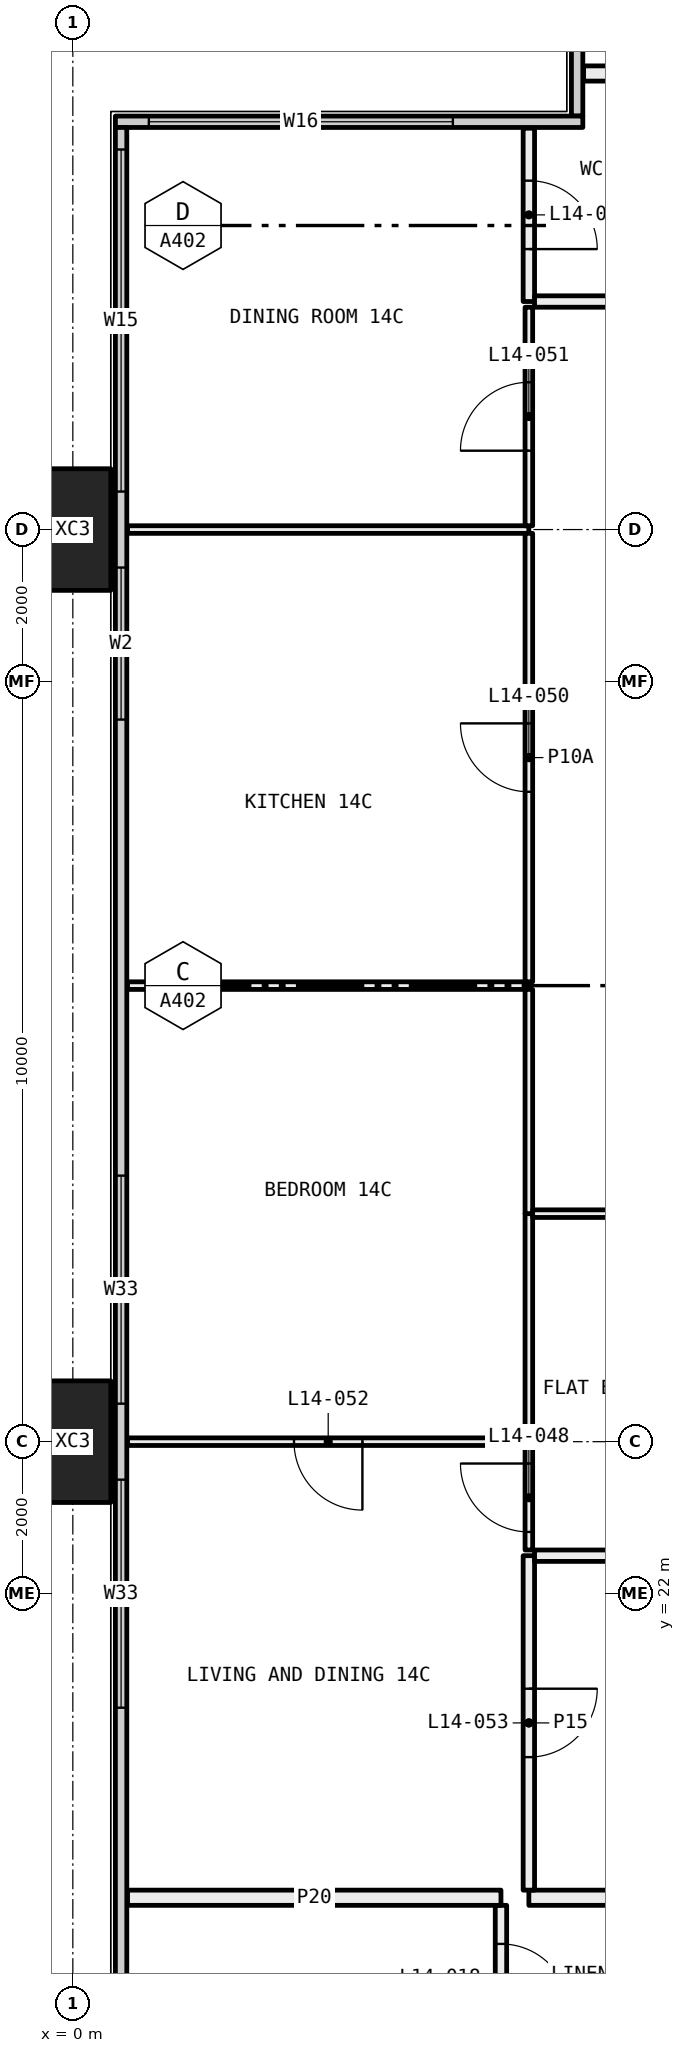
"""IFC4 building model, lengths in metres.
Left out: names, types, materials, properties, quantities, classifications, styles, units other than length and angle.
Written with IfcOpenShell. Run it as: python <this file> out.ifc"""

import sys

from ifc_helpers import new_model, si_unit, direction, frame, frame_2d, origin, origin_2d, place, context, subcontext, project, spatial, rectangle, hollow_rectangle, extrude, element, fill, save


model = new_model("IFC4")
c1 = context("Model", 3, precision=1e-05, world=origin(), true_north=direction((0.0, 1.0)))
c2 = subcontext(c1, "Body", "Model", "MODEL_VIEW")
j1 = project(units=[si_unit("LENGTHUNIT", "METRE"), si_unit("PLANEANGLEUNIT", "RADIAN")], contexts=[c1])
p1 = place(None, origin())
s1 = spatial("IfcSite", under=j1, at=p1, CompositionType="ELEMENT")
p2 = place(p1, origin())
s2 = spatial("IfcBuilding", under=s1, at=p2, CompositionType="ELEMENT")
p3 = place(p2, frame((0.0, 0.0, 61.05)))
s3 = spatial("IfcBuildingStorey", under=s2, at=p3, CompositionType="ELEMENT", Elevation=61.05)
for number, where, z_axis, x_axis in (
    (1, (0.0, 24.0, -0.4), (0.0, 0.0, 1.0), (0.0, 1.0, 0.0)),
    (2, (0.0, 36.0, -0.4), (0.0, 0.0, 1.0), (0.0, 1.0, 0.0)),
):
    element("IfcColumn", number, at=place(p3, frame(where, z_axis=z_axis, x_axis=x_axis)), inside=s3, PredefinedType="COLUMN", context=c2, shape_type="SweptSolid", body=[
        extrude(hollow_rectangle(XDim=1.6, YDim=1.0, WallThickness=0.065, at=origin_2d()), origin(), (0.0, 0.0, 1.0), 3.45),
    ])
p4 = place(p3, frame((6.635, 41.44, 0.0), z_axis=(0.0, 0.0, 1.0), x_axis=(0.0, 1.0, 0.0)))
e3 = element("IfcWall", 3, at=p4, inside=s3, PredefinedType="ELEMENTEDWALL", context=c2, shape_type="SweptSolid", body=[
    extrude(rectangle(XDim=5.85, YDim=0.15, at=frame_2d((2.925, 0.0))), origin(), (0.0, 0.0, 1.0), 3.05),
])
p5 = place(p4, frame((1.56, 0.0, 0.45)))
e4 = element("IfcOpeningElement", 4, at=p5, cuts=e3, PredefinedType="OPENING", context=c2, shape_type="SweptSolid", body=[
    extrude(rectangle(XDim=4.0, YDim=2.55, at=frame_2d((2.0, 1.275))), frame((0.0, 0.085, 0.0), z_axis=(0.0, -1.0, 0.0), x_axis=(1.0, 0.0, 0.0)), (0.0, 0.0, 1.0), 0.17),
])
p6 = place(p3, frame((0.56, 41.365, 0.0), z_axis=(0.0, 0.0, 1.0), x_axis=(1.0, 0.0, 0.0)))
e5 = element("IfcWall", 5, at=p6, inside=s3, PredefinedType="ELEMENTEDWALL", context=c2, shape_type="SweptSolid", body=[
    extrude(rectangle(XDim=6.15, YDim=0.15, at=frame_2d((3.075, 0.0))), origin(), (0.0, 0.0, 1.0), 3.05),
])
p7 = place(p6, frame((0.44, 0.0, 0.45)))
e6 = element("IfcOpeningElement", 6, at=p7, cuts=e5, PredefinedType="OPENING", context=c2, shape_type="SweptSolid", body=[
    extrude(rectangle(XDim=4.0, YDim=2.55, at=frame_2d((2.0, 1.275))), frame((0.0, 0.085, 0.0), z_axis=(0.0, -1.0, 0.0), x_axis=(1.0, 0.0, 0.0)), (0.0, 0.0, 1.0), 0.17),
])
p8 = place(p3, frame((0.635, 6.71, 0.0), z_axis=(0.0, 0.0, 1.0), x_axis=(0.0, 1.0, 0.0)))
e7 = element("IfcWall", 7, at=p8, inside=s3, PredefinedType="ELEMENTEDWALL", context=c2, shape_type="SweptSolid", body=[
    extrude(rectangle(XDim=34.58, YDim=0.15, at=frame_2d((17.29, 0.0))), origin(), (0.0, 0.0, 1.0), 3.05),
])
p9 = place(p8, frame((0.29, 0.0, 0.45)))
e8 = element("IfcOpeningElement", 8, at=p9, cuts=e7, PredefinedType="OPENING", context=c2, shape_type="SweptSolid", body=[
    extrude(rectangle(XDim=4.5, YDim=2.55, at=frame_2d((2.25, 1.275))), frame((0.0, 0.085, 0.0), z_axis=(0.0, -1.0, 0.0), x_axis=(1.0, 0.0, 0.0)), (0.0, 0.0, 1.0), 0.17),
])
p10 = place(p8, frame((5.79, 0.0, 0.45)))
e9 = element("IfcOpeningElement", 9, at=p10, cuts=e7, PredefinedType="OPENING", context=c2, shape_type="SweptSolid", body=[
    extrude(rectangle(XDim=3.0, YDim=2.55, at=frame_2d((1.5, 1.275))), frame((0.0, 0.085, 0.0), z_axis=(0.0, -1.0, 0.0), x_axis=(1.0, 0.0, 0.0)), (0.0, 0.0, 1.0), 0.17),
])
p11 = place(p8, frame((13.79, 0.0, 0.45)))
e10 = element("IfcOpeningElement", 10, at=p11, cuts=e7, PredefinedType="OPENING", context=c2, shape_type="SweptSolid", body=[
    extrude(rectangle(XDim=3.0, YDim=2.55, at=frame_2d((1.5, 1.275))), frame((0.0, 0.085, 0.0), z_axis=(0.0, -1.0, 0.0), x_axis=(1.0, 0.0, 0.0)), (0.0, 0.0, 1.0), 0.17),
])
p12 = place(p8, frame((17.79, 0.0, 0.45)))
e11 = element("IfcOpeningElement", 11, at=p12, cuts=e7, PredefinedType="OPENING", context=c2, shape_type="SweptSolid", body=[
    extrude(rectangle(XDim=3.0, YDim=2.55, at=frame_2d((1.5, 1.275))), frame((0.0, 0.085, 0.0), z_axis=(0.0, -1.0, 0.0), x_axis=(1.0, 0.0, 0.0)), (0.0, 0.0, 1.0), 0.17),
])
p13 = place(p8, frame((26.79, 0.0, 0.45)))
e12 = element("IfcOpeningElement", 12, at=p13, cuts=e7, PredefinedType="OPENING", context=c2, shape_type="SweptSolid", body=[
    extrude(rectangle(XDim=2.0, YDim=2.55, at=frame_2d((1.0, 1.275))), frame((0.0, 0.085, 0.0), z_axis=(0.0, -1.0, 0.0), x_axis=(1.0, 0.0, 0.0)), (0.0, 0.0, 1.0), 0.17),
])
p14 = place(p8, frame((29.79, 0.0, 0.45)))
e13 = element("IfcOpeningElement", 13, at=p14, cuts=e7, PredefinedType="OPENING", context=c2, shape_type="SweptSolid", body=[
    extrude(rectangle(XDim=4.5, YDim=2.55, at=frame_2d((2.25, 1.275))), frame((0.0, 0.085, 0.0), z_axis=(0.0, -1.0, 0.0), x_axis=(1.0, 0.0, 0.0)), (0.0, 0.0, 1.0), 0.17),
])
p15 = place(p3, frame((5.633, 15.985, 0.0), z_axis=(0.0, 0.0, 1.0), x_axis=(0.0, 1.0, 0.0)))
e14 = element("IfcWall", 14, at=p15, inside=s3, PredefinedType="PARTITIONING", context=c2, shape_type="SweptSolid", body=[
    extrude(rectangle(XDim=1.915, YDim=0.15, at=frame_2d((0.958, 0.0))), origin(), (0.0, 0.0, 1.0), 3.05),
])
p16 = place(p15, frame((0.508, 0.0, 0.0)))
e15 = element("IfcOpeningElement", 15, at=p16, cuts=e14, PredefinedType="OPENING", context=c2, shape_type="SweptSolid", body=[
    extrude(rectangle(XDim=0.9, YDim=2.1, at=frame_2d((0.45, 1.05))), frame((0.0, 0.085, 0.0), z_axis=(0.0, -1.0, 0.0), x_axis=(1.0, 0.0, 0.0)), (0.0, 0.0, 1.0), 0.17),
])
p17 = place(p3, frame((5.633, 18.0, 0.0), z_axis=(0.0, 0.0, 1.0), x_axis=(-1.0, 0.0, 0.0)))
e16 = element("IfcWall", 16, at=p17, inside=s3, PredefinedType="PARTITIONING", context=c2, shape_type="SweptSolid", body=[
    extrude(rectangle(XDim=4.913, YDim=0.2, at=frame_2d((2.457, 0.0))), origin(), (0.0, 0.0, 1.0), 3.05),
])
p18 = place(p3, frame((8.644, 18.0, 0.0), z_axis=(0.0, 0.0, 1.0), x_axis=(-1.0, 0.0, 0.0)))
e17 = element("IfcWall", 17, at=p18, inside=s3, PredefinedType="PARTITIONING", context=c2, shape_type="SweptSolid", body=[
    extrude(rectangle(XDim=2.644, YDim=0.2, at=frame_2d((1.322, 0.0))), origin(), (0.0, 0.0, 1.0), 3.05),
])
p19 = place(p3, frame((6.0, 24.0, 0.0), z_axis=(0.0, 0.0, 1.0), x_axis=(-1.0, 0.0, 0.0)))
e18 = element("IfcWall", 18, at=p19, inside=s3, PredefinedType="PARTITIONING", context=c2, shape_type="SweptSolid", body=[
    extrude(rectangle(XDim=5.28, YDim=0.1, at=frame_2d((2.64, 0.0))), origin(), (0.0, 0.0, 1.0), 2.45),
])
p20 = place(p19, frame((2.19, 0.0, 0.0)))
e19 = element("IfcOpeningElement", 19, at=p20, cuts=e18, PredefinedType="OPENING", context=c2, shape_type="SweptSolid", body=[
    extrude(rectangle(XDim=0.9, YDim=2.1, at=frame_2d((0.45, 1.05))), frame((0.0, 0.06, 0.0), z_axis=(0.0, -1.0, 0.0), x_axis=(1.0, 0.0, 0.0)), (0.0, 0.0, 1.0), 0.12),
])
p21 = place(p3, frame((6.0, 18.1, 0.0), z_axis=(0.0, 0.0, 1.0), x_axis=(0.0, 1.0, 0.0)))
e20 = element("IfcWall", 20, at=p21, inside=s3, PredefinedType="PARTITIONING", context=c2, shape_type="SweptSolid", body=[
    extrude(rectangle(XDim=4.4, YDim=0.15, at=frame_2d((2.2, 0.0))), origin(), (0.0, 0.0, 1.0), 3.05),
])
p22 = place(p21, frame((1.75, 0.0, 0.0)))
e21 = element("IfcOpeningElement", 21, at=p22, cuts=e20, PredefinedType="OPENING", context=c2, shape_type="SweptSolid", body=[
    extrude(rectangle(XDim=0.9, YDim=2.1, at=frame_2d((0.45, 1.05))), frame((0.0, 0.085, 0.0), z_axis=(0.0, -1.0, 0.0), x_axis=(1.0, 0.0, 0.0)), (0.0, 0.0, 1.0), 0.17),
])
p23 = place(p3, frame((6.0, 22.575, 0.0), z_axis=(0.0, 0.0, 1.0), x_axis=(0.0, 1.0, 0.0)))
e22 = element("IfcWall", 22, at=p23, inside=s3, PredefinedType="PARTITIONING", context=c2, shape_type="SweptSolid", body=[
    extrude(rectangle(XDim=1.375, YDim=0.1, at=frame_2d((0.688, 0.0))), origin(), (0.0, 0.0, 1.0), 2.45),
])
p24 = place(p23, frame((0.238, 0.0, 0.0)))
e23 = element("IfcOpeningElement", 23, at=p24, cuts=e22, PredefinedType="OPENING", context=c2, shape_type="SweptSolid", body=[
    extrude(rectangle(XDim=0.9, YDim=2.1, at=frame_2d((0.45, 1.05))), frame((0.0, 0.06, 0.0), z_axis=(0.0, -1.0, 0.0), x_axis=(1.0, 0.0, 0.0)), (0.0, 0.0, 1.0), 0.12),
])
p25 = place(p3, frame((6.0, 30.0, 0.0), z_axis=(0.0, 0.0, 1.0), x_axis=(-1.0, 0.0, 0.0)))
e24 = element("IfcWall", 24, at=p25, inside=s3, PredefinedType="PARTITIONING", context=c2, shape_type="SweptSolid", body=[
    extrude(rectangle(XDim=5.28, YDim=0.1, at=frame_2d((2.64, 0.0))), origin(), (0.0, 0.0, 1.0), 3.05),
])
p26 = place(p3, frame((6.0, 24.05, 0.0), z_axis=(0.0, 0.0, 1.0), x_axis=(0.0, 1.0, 0.0)))
e25 = element("IfcWall", 25, at=p26, inside=s3, PredefinedType="PARTITIONING", context=c2, shape_type="SweptSolid", body=[
    extrude(rectangle(XDim=2.95, YDim=0.1, at=frame_2d((1.475, 0.0))), origin(), (0.0, 0.0, 1.0), 2.45),
])
p27 = place(p3, frame((6.0, 27.0, 0.0), z_axis=(0.0, 0.0, 1.0), x_axis=(0.0, 1.0, 0.0)))
e26 = element("IfcWall", 26, at=p27, inside=s3, PredefinedType="PARTITIONING", context=c2, shape_type="SweptSolid", body=[
    extrude(rectangle(XDim=2.95, YDim=0.1, at=frame_2d((1.475, 0.0))), origin(), (0.0, 0.0, 1.0), 3.05),
])
p28 = place(p3, frame((6.0, 36.0, 0.0), z_axis=(0.0, 0.0, 1.0), x_axis=(-1.0, 0.0, 0.0)))
e27 = element("IfcWall", 27, at=p28, inside=s3, PredefinedType="PARTITIONING", context=c2, shape_type="SweptSolid", body=[
    extrude(rectangle(XDim=5.28, YDim=0.1, at=frame_2d((2.64, 0.0))), origin(), (0.0, 0.0, 1.0), 2.45),
])
p29 = place(p3, frame((6.0, 30.05, 0.0), z_axis=(0.0, 0.0, 1.0), x_axis=(0.0, 1.0, 0.0)))
e28 = element("IfcWall", 28, at=p29, inside=s3, PredefinedType="PARTITIONING", context=c2, shape_type="SweptSolid", body=[
    extrude(rectangle(XDim=5.9, YDim=0.1, at=frame_2d((2.95, 0.0))), origin(), (0.0, 0.0, 1.0), 2.45),
])
p30 = place(p29, frame((2.5, 0.0, 0.0)))
e29 = element("IfcOpeningElement", 29, at=p30, cuts=e28, PredefinedType="OPENING", context=c2, shape_type="SweptSolid", body=[
    extrude(rectangle(XDim=0.9, YDim=2.1, at=frame_2d((0.45, 1.05))), frame((0.0, 0.06, 0.0), z_axis=(0.0, -1.0, 0.0), x_axis=(1.0, 0.0, 0.0)), (0.0, 0.0, 1.0), 0.12),
])
p31 = place(p3, frame((6.0, 36.05, 0.0), z_axis=(0.0, 0.0, 1.0), x_axis=(0.0, 1.0, 0.0)))
e30 = element("IfcWall", 30, at=p31, inside=s3, PredefinedType="PARTITIONING", context=c2, shape_type="SweptSolid", body=[
    extrude(rectangle(XDim=2.875, YDim=0.1, at=frame_2d((1.438, 0.0))), origin(), (0.0, 0.0, 1.0), 2.45),
])
p32 = place(p31, frame((0.988, 0.0, 0.0)))
e31 = element("IfcOpeningElement", 31, at=p32, cuts=e30, PredefinedType="OPENING", context=c2, shape_type="SweptSolid", body=[
    extrude(rectangle(XDim=0.9, YDim=2.1, at=frame_2d((0.45, 1.05))), frame((0.0, 0.06, 0.0), z_axis=(0.0, -1.0, 0.0), x_axis=(1.0, 0.0, 0.0)), (0.0, 0.0, 1.0), 0.12),
])
p33 = place(p3, frame((6.0, 39.0, 0.0), z_axis=(0.0, 0.0, 1.0), x_axis=(0.0, 1.0, 0.0)))
e32 = element("IfcWall", 32, at=p33, inside=s3, PredefinedType="PARTITIONING", context=c2, shape_type="SweptSolid", body=[
    extrude(rectangle(XDim=2.28, YDim=0.15, at=frame_2d((1.14, 0.0))), origin(), (0.0, 0.0, 1.0), 3.05),
])
p34 = place(p33, frame((0.69, 0.0, 0.0)))
e33 = element("IfcOpeningElement", 33, at=p34, cuts=e32, PredefinedType="OPENING", context=c2, shape_type="SweptSolid", body=[
    extrude(rectangle(XDim=0.9, YDim=2.1, at=frame_2d((0.45, 1.05))), frame((0.0, 0.085, 0.0), z_axis=(0.0, -1.0, 0.0), x_axis=(1.0, 0.0, 0.0)), (0.0, 0.0, 1.0), 0.17),
])
p35 = place(p3, frame((10.0, 22.5, 0.0), z_axis=(0.0, 0.0, 1.0), x_axis=(-1.0, 0.0, 0.0)))
e34 = element("IfcWall", 34, at=p35, inside=s3, PredefinedType="PARTITIONING", context=c2, shape_type="SweptSolid", body=[
    extrude(rectangle(XDim=3.925, YDim=0.15, at=frame_2d((1.962, 0.0))), origin(), (0.0, 0.0, 1.0), 3.05),
])
p36 = place(p3, frame((10.0, 27.0, 0.0), z_axis=(0.0, 0.0, 1.0), x_axis=(-1.0, 0.0, 0.0)))
e35 = element("IfcWall", 35, at=p36, inside=s3, PredefinedType="PARTITIONING", context=c2, shape_type="SweptSolid", body=[
    extrude(rectangle(XDim=3.95, YDim=0.1, at=frame_2d((1.975, 0.0))), origin(), (0.0, 0.0, 1.0), 3.05),
])
p37 = place(p36, frame((1.525, 0.0, 0.0)))
e36 = element("IfcOpeningElement", 36, at=p37, cuts=e35, PredefinedType="OPENING", context=c2, shape_type="SweptSolid", body=[
    extrude(rectangle(XDim=0.9, YDim=2.1, at=frame_2d((0.45, 1.05))), frame((0.0, 0.06, 0.0), z_axis=(0.0, -1.0, 0.0), x_axis=(1.0, 0.0, 0.0)), (0.0, 0.0, 1.0), 0.12),
])
p38 = place(p3, frame((7.8, 39.0, 0.0), z_axis=(0.0, 0.0, 1.0), x_axis=(-1.0, 0.0, 0.0)))
e37 = element("IfcWall", 37, at=p38, inside=s3, PredefinedType="PARTITIONING", context=c2, shape_type="SweptSolid", body=[
    extrude(rectangle(XDim=1.725, YDim=0.15, at=frame_2d((0.863, 0.0))), origin(), (0.0, 0.0, 1.0), 3.05),
])
p39 = place(p3, frame((7.8, 42.0, 0.0), z_axis=(0.0, 0.0, 1.0), x_axis=(-1.0, 0.0, 0.0)))
e38 = element("IfcWall", 38, at=p39, inside=s3, PredefinedType="PARTITIONING", context=c2, shape_type="SweptSolid", body=[
    extrude(rectangle(XDim=1.08, YDim=0.2, at=frame_2d((0.54, 0.0))), origin(), (0.0, 0.0, 1.0), 3.05),
])
p40 = place(p7, origin())
e39 = element("IfcWindow", 39, at=p40, inside=s3, PartitioningType="SINGLE_PANEL", PredefinedType="WINDOW", context=c2, shape_type="SweptSolid", body=[
    extrude(rectangle(XDim=4.0, YDim=2.55, at=frame_2d((2.0, 1.275))), frame((0.0, 0.03, 0.0), z_axis=(0.0, -1.0, 0.0), x_axis=(1.0, 0.0, 0.0)), (0.0, 0.0, 1.0), 0.06),
])
fill(e6, e39)
p41 = place(p11, origin())
e40 = element("IfcWindow", 40, at=p41, inside=s3, PartitioningType="SINGLE_PANEL", PredefinedType="WINDOW", context=c2, shape_type="SweptSolid", body=[
    extrude(rectangle(XDim=3.0, YDim=2.55, at=frame_2d((1.5, 1.275))), frame((0.0, 0.03, 0.0), z_axis=(0.0, -1.0, 0.0), x_axis=(1.0, 0.0, 0.0)), (0.0, 0.0, 1.0), 0.06),
])
fill(e10, e40)
p42 = place(p12, origin())
e41 = element("IfcWindow", 41, at=p42, inside=s3, PartitioningType="SINGLE_PANEL", PredefinedType="WINDOW", context=c2, shape_type="SweptSolid", body=[
    extrude(rectangle(XDim=3.0, YDim=2.55, at=frame_2d((1.5, 1.275))), frame((0.0, 0.03, 0.0), z_axis=(0.0, -1.0, 0.0), x_axis=(1.0, 0.0, 0.0)), (0.0, 0.0, 1.0), 0.06),
])
fill(e11, e41)
p43 = place(p13, origin())
e42 = element("IfcWindow", 42, at=p43, inside=s3, PartitioningType="SINGLE_PANEL", PredefinedType="WINDOW", context=c2, shape_type="SweptSolid", body=[
    extrude(rectangle(XDim=2.0, YDim=2.55, at=frame_2d((1.0, 1.275))), frame((0.0, 0.03, 0.0), z_axis=(0.0, -1.0, 0.0), x_axis=(1.0, 0.0, 0.0)), (0.0, 0.0, 1.0), 0.06),
])
fill(e12, e42)
p44 = place(p14, origin())
e43 = element("IfcWindow", 43, at=p44, inside=s3, PartitioningType="SINGLE_PANEL", PredefinedType="WINDOW", context=c2, shape_type="SweptSolid", body=[
    extrude(rectangle(XDim=4.5, YDim=2.55, at=frame_2d((2.25, 1.275))), frame((0.0, 0.03, 0.0), z_axis=(0.0, -1.0, 0.0), x_axis=(1.0, 0.0, 0.0)), (0.0, 0.0, 1.0), 0.06),
])
fill(e13, e43)
p45 = place(p16, frame((0.9, 0.0, 0.0), x_axis=(-1.0, 0.0, 0.0)))
e44 = element("IfcDoor", 44, at=p45, inside=s3, OperationType="SINGLE_SWING_LEFT", PredefinedType="DOOR", context=c2, shape_type="SweptSolid", body=[
    extrude(rectangle(XDim=0.9, YDim=2.1, at=frame_2d((0.45, 1.05))), frame((0.0, 0.025, 0.0), z_axis=(0.0, -1.0, 0.0), x_axis=(1.0, 0.0, 0.0)), (0.0, 0.0, 1.0), 0.05),
])
fill(e15, e44)
p46 = place(p24, origin())
e45 = element("IfcDoor", 45, at=p46, inside=s3, OperationType="SINGLE_SWING_LEFT", PredefinedType="DOOR", context=c2, shape_type="SweptSolid", body=[
    extrude(rectangle(XDim=0.9, YDim=2.1, at=frame_2d((0.45, 1.05))), frame((0.0, 0.025, 0.0), z_axis=(0.0, -1.0, 0.0), x_axis=(1.0, 0.0, 0.0)), (0.0, 0.0, 1.0), 0.05),
])
fill(e23, e45)
p47 = place(p30, origin())
e46 = element("IfcDoor", 46, at=p47, inside=s3, OperationType="SINGLE_SWING_LEFT", PredefinedType="DOOR", context=c2, shape_type="SweptSolid", body=[
    extrude(rectangle(XDim=0.9, YDim=2.1, at=frame_2d((0.45, 1.05))), frame((0.0, 0.025, 0.0), z_axis=(0.0, -1.0, 0.0), x_axis=(1.0, 0.0, 0.0)), (0.0, 0.0, 1.0), 0.05),
])
fill(e29, e46)
p48 = place(p32, origin())
e47 = element("IfcDoor", 47, at=p48, inside=s3, OperationType="SINGLE_SWING_RIGHT", PredefinedType="DOOR", context=c2, shape_type="SweptSolid", body=[
    extrude(rectangle(XDim=0.9, YDim=2.1, at=frame_2d((0.45, 1.05))), frame((0.0, 0.025, 0.0), z_axis=(0.0, -1.0, 0.0), x_axis=(1.0, 0.0, 0.0)), (0.0, 0.0, 1.0), 0.05),
])
fill(e31, e47)
p49 = place(p20, origin())
e48 = element("IfcDoor", 48, at=p49, inside=s3, OperationType="SINGLE_SWING_RIGHT", PredefinedType="DOOR", context=c2, shape_type="SweptSolid", body=[
    extrude(rectangle(XDim=0.9, YDim=2.1, at=frame_2d((0.45, 1.05))), frame((0.0, 0.025, 0.0), z_axis=(0.0, -1.0, 0.0), x_axis=(1.0, 0.0, 0.0)), (0.0, 0.0, 1.0), 0.05),
])
fill(e19, e48)
p50 = place(p22, frame((0.9, 0.0, 0.0), x_axis=(-1.0, 0.0, 0.0)))
e49 = element("IfcDoor", 49, at=p50, inside=s3, OperationType="SINGLE_SWING_RIGHT", PredefinedType="DOOR", context=c2, shape_type="SweptSolid", body=[
    extrude(rectangle(XDim=0.9, YDim=2.1, at=frame_2d((0.45, 1.05))), frame((0.0, 0.025, 0.0), z_axis=(0.0, -1.0, 0.0), x_axis=(1.0, 0.0, 0.0)), (0.0, 0.0, 1.0), 0.05),
])
fill(e21, e49)
p51 = place(p34, frame((0.9, 0.0, 0.0), x_axis=(-1.0, 0.0, 0.0)))
e50 = element("IfcDoor", 50, at=p51, inside=s3, OperationType="SINGLE_SWING_LEFT", PredefinedType="DOOR", context=c2, shape_type="SweptSolid", body=[
    extrude(rectangle(XDim=0.9, YDim=2.1, at=frame_2d((0.45, 1.05))), frame((0.0, 0.025, 0.0), z_axis=(0.0, -1.0, 0.0), x_axis=(1.0, 0.0, 0.0)), (0.0, 0.0, 1.0), 0.05),
])
fill(e33, e50)
save(model, sys.argv[1])
